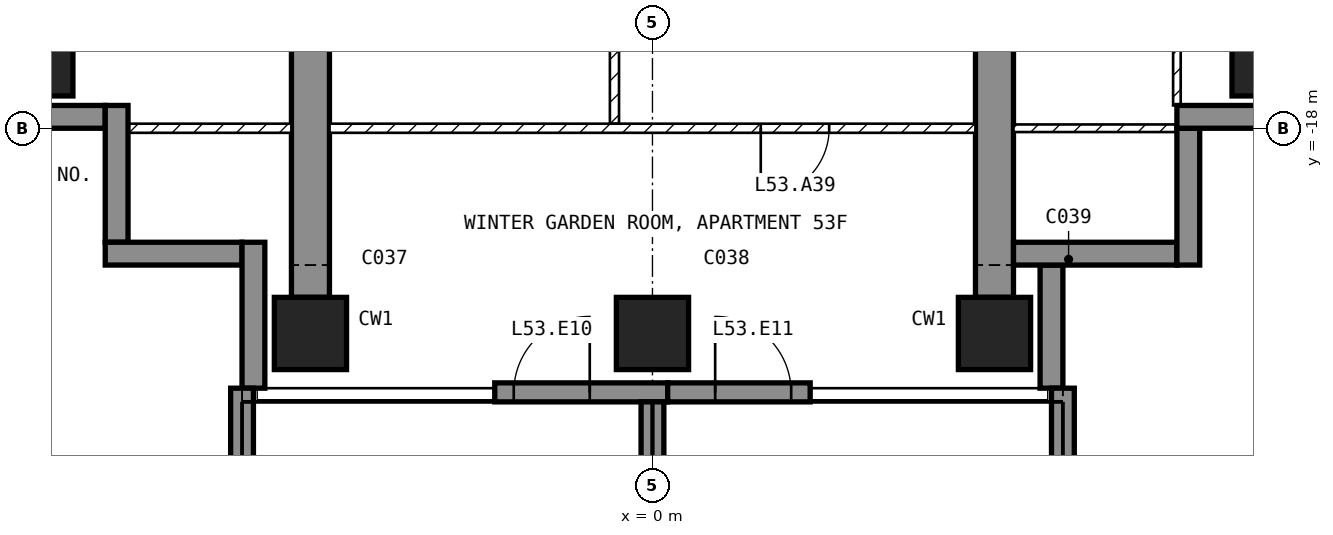
"""IFC4 building model, lengths in metres.
Left out: names, types, materials, properties, quantities, classifications, styles, units other than length and angle.
Written with IfcOpenShell. Run it as: python <this file> out.ifc"""

import sys

from ifc_helpers import new_model, si_unit, direction, frame, frame_2d, origin, origin_2d, place, context, subcontext, project, spatial, polyline, rectangle, outline, extrude, element, fill, save


model = new_model("IFC4")
c1 = context("Model", 3, precision=1e-05, world=origin(), true_north=direction((0.0, 1.0)))
c2 = subcontext(c1, "Body", "Model", "MODEL_VIEW")
j1 = project(units=[si_unit("LENGTHUNIT", "METRE"), si_unit("PLANEANGLEUNIT", "RADIAN")], contexts=[c1])
p1 = place(None, origin())
s1 = spatial("IfcSite", under=j1, at=p1, CompositionType="ELEMENT")
p2 = place(p1, origin())
s2 = spatial("IfcBuilding", under=s1, at=p2, CompositionType="ELEMENT")
p3 = place(p2, frame((0.0, 0.0, 212.1)))
s3 = spatial("IfcBuildingStorey", under=s2, at=p3, CompositionType="ELEMENT", Elevation=212.1)
for number, where, z_axis, x_axis in (
    (1, (-8.1, -17.1, -0.25), (0.0, 0.0, 1.0), (1.0, 0.0, 0.0)),
    (2, (-4.5, -20.7, -0.25), (0.0, 0.0, 1.0), (1.0, 0.0, 0.0)),
    (3, (0.0, -20.7, -0.25), (0.0, 0.0, 1.0), (1.0, 0.0, 0.0)),
    (4, (4.5, -20.7, -0.25), (0.0, 0.0, 1.0), (1.0, 0.0, 0.0)),
    (5, (8.1, -17.1, -0.25), (0.0, 0.0, 1.0), (1.0, 0.0, 0.0)),
):
    element("IfcColumn", number, at=place(p3, frame(where, z_axis=z_axis, x_axis=x_axis)), inside=s3, PredefinedType="COLUMN", context=c2, shape_type="SweptSolid", body=[
        extrude(rectangle(XDim=0.95, YDim=0.95, at=origin_2d()), origin(), (0.0, 0.0, 1.0), 3.5),
    ])
for number, where, z_axis, x_axis in (
    (6, (-4.75, -20.225, -0.25), (1.0, 0.0, 0.0), (0.0, 1.0, 0.0)),
    (7, (4.25, -20.225, -0.25), (1.0, 0.0, 0.0), (0.0, 1.0, 0.0)),
):
    element("IfcWall", number, at=place(p3, frame(where, z_axis=z_axis, x_axis=x_axis)), inside=s3, PredefinedType="SHEAR", context=c2, shape_type="SweptSolid", body=[
        extrude(outline(polyline([(0.0, 0.0), (6.725, 0.0), (6.725, 2.65), (9.125, 2.65), (9.125, 0.0), (11.225, 0.0), (11.225, 3.5), (0.0, 3.5), (0.0, 0.0)])), origin(), (0.0, 0.0, 1.0), 0.5),
    ])
p4 = place(p3, frame((-2.075, -21.475, 0.0), z_axis=(0.0, 0.0, 1.0), x_axis=(1.0, 0.0, 0.0)))
e8 = element("IfcWall", 8, at=p4, inside=s3, PredefinedType="SOLIDWALL", context=c2, shape_type="SweptSolid", body=[
    extrude(rectangle(XDim=2.275, YDim=0.25, at=frame_2d((1.137, 0.0))), origin(), (0.0, 0.0, 1.0), 3.25),
])
p5 = place(p4, frame((0.25, 0.0, 0.0)))
e9 = element("IfcOpeningElement", 9, at=p5, cuts=e8, PredefinedType="OPENING", context=c2, shape_type="SweptSolid", body=[
    extrude(rectangle(XDim=1.0, YDim=2.4, at=frame_2d((0.5, 1.2))), frame((0.0, 0.135, 0.0), z_axis=(0.0, -1.0, 0.0), x_axis=(1.0, 0.0, 0.0)), (0.0, 0.0, 1.0), 0.27),
])
p6 = place(p3, frame((0.2, -21.475, 0.0), z_axis=(0.0, 0.0, 1.0), x_axis=(1.0, 0.0, 0.0)))
e10 = element("IfcWall", 10, at=p6, inside=s3, PredefinedType="SOLIDWALL", context=c2, shape_type="SweptSolid", body=[
    extrude(rectangle(XDim=1.875, YDim=0.25, at=frame_2d((0.938, 0.0))), origin(), (0.0, 0.0, 1.0), 3.25),
])
p7 = place(p6, frame((0.625, 0.0, 0.0)))
e11 = element("IfcOpeningElement", 11, at=p7, cuts=e10, PredefinedType="OPENING", context=c2, shape_type="SweptSolid", body=[
    extrude(rectangle(XDim=1.0, YDim=2.4, at=frame_2d((0.5, 1.2))), frame((0.0, 0.135, 0.0), z_axis=(0.0, -1.0, 0.0), x_axis=(1.0, 0.0, 0.0)), (0.0, 0.0, 1.0), 0.27),
])
p8 = place(p3, frame((5.25, -21.42, 0.0), z_axis=(0.0, 0.0, 1.0), x_axis=(0.0, 1.0, 0.0)))
e12 = element("IfcWall", 12, at=p8, inside=s3, PredefinedType="SOLIDWALL", context=c2, shape_type="SweptSolid", body=[
    extrude(rectangle(XDim=1.62, YDim=0.3, at=frame_2d((0.81, 0.0))), origin(), (0.0, 0.0, 1.0), 3.25),
])
p9 = place(p3, frame((4.75, -19.65, 0.0), z_axis=(0.0, 0.0, 1.0), x_axis=(1.0, 0.0, 0.0)))
e13 = element("IfcWall", 13, at=p9, inside=s3, PredefinedType="SOLIDWALL", context=c2, shape_type="SweptSolid", body=[
    extrude(rectangle(XDim=2.15, YDim=0.3, at=frame_2d((1.075, 0.0))), origin(), (0.0, 0.0, 1.0), 3.25),
])
p10 = place(p3, frame((7.05, -19.8, 0.0), z_axis=(0.0, 0.0, 1.0), x_axis=(0.0, 1.0, 0.0)))
e14 = element("IfcWall", 14, at=p10, inside=s3, PredefinedType="SOLIDWALL", context=c2, shape_type="SweptSolid", body=[
    extrude(rectangle(XDim=1.8, YDim=0.3, at=frame_2d((0.9, 0.0))), origin(), (0.0, 0.0, 1.0), 3.25),
])
p11 = place(p3, frame((6.9, -17.85, 0.0), z_axis=(0.0, 0.0, 1.0), x_axis=(1.0, 0.0, 0.0)))
e15 = element("IfcWall", 15, at=p11, inside=s3, PredefinedType="SOLIDWALL", context=c2, shape_type="SweptSolid", body=[
    extrude(rectangle(XDim=1.85, YDim=0.3, at=frame_2d((0.925, 0.0))), origin(), (0.0, 0.0, 1.0), 3.25),
])
p12 = place(p3, frame((-8.75, -17.85, 0.0), z_axis=(0.0, 0.0, 1.0), x_axis=(1.0, 0.0, 0.0)))
e16 = element("IfcWall", 16, at=p12, inside=s3, PredefinedType="SOLIDWALL", context=c2, shape_type="SweptSolid", body=[
    extrude(rectangle(XDim=1.55, YDim=0.3, at=frame_2d((0.775, 0.0))), origin(), (0.0, 0.0, 1.0), 3.25),
])
for number, where, z_axis, x_axis in (
    (17, (-7.05, -17.7, 0.0), (0.0, 0.0, 1.0), (0.0, -1.0, 0.0)),
    (18, (-7.2, -19.65, 0.0), (0.0, 0.0, 1.0), (1.0, 0.0, 0.0)),
):
    element("IfcWall", number, at=place(p3, frame(where, z_axis=z_axis, x_axis=x_axis)), inside=s3, PredefinedType="SOLIDWALL", context=c2, shape_type="SweptSolid", body=[
        extrude(rectangle(XDim=1.8, YDim=0.3, at=frame_2d((0.9, 0.0))), origin(), (0.0, 0.0, 1.0), 3.25),
    ])
p13 = place(p3, frame((-5.25, -19.5, 0.0), z_axis=(0.0, 0.0, 1.0), x_axis=(0.0, -1.0, 0.0)))
e19 = element("IfcWall", 19, at=p13, inside=s3, PredefinedType="SOLIDWALL", context=c2, shape_type="SweptSolid", body=[
    extrude(rectangle(XDim=1.92, YDim=0.3, at=frame_2d((0.96, 0.0))), origin(), (0.0, 0.0, 1.0), 3.25),
])
p14 = place(p3, frame((-5.4, -21.42, 0.0), z_axis=(0.0, 0.0, 1.0), x_axis=(0.0, -1.0, 0.0)))
e20 = element("IfcWall", 20, at=p14, inside=s3, PredefinedType="SOLIDWALL", context=c2, shape_type="SweptSolid", body=[
    extrude(rectangle(XDim=2.88, YDim=0.3, at=frame_2d((1.44, 0.0))), origin(), (0.0, 0.0, 1.0), 3.25),
])
p15 = place(p3, frame((0.0, -21.6, 0.0), z_axis=(0.0, 0.0, 1.0), x_axis=(0.0, -1.0, 0.0)))
e21 = element("IfcWall", 21, at=p15, inside=s3, PredefinedType="SOLIDWALL", context=c2, shape_type="SweptSolid", body=[
    extrude(rectangle(XDim=2.7, YDim=0.3, at=frame_2d((1.35, 0.0))), origin(), (0.0, 0.0, 1.0), 3.25),
])
p16 = place(p3, frame((5.4, -21.42, 0.0), z_axis=(0.0, 0.0, 1.0), x_axis=(0.0, -1.0, 0.0)))
e22 = element("IfcWall", 22, at=p16, inside=s3, PredefinedType="SOLIDWALL", context=c2, shape_type="SweptSolid", body=[
    extrude(rectangle(XDim=2.88, YDim=0.3, at=frame_2d((1.44, 0.0))), origin(), (0.0, 0.0, 1.0), 3.25),
])
p17 = place(p3, frame((-0.5, -17.94, 0.0), z_axis=(0.0, 0.0, 1.0), x_axis=(0.0, 1.0, 0.0)))
e23 = element("IfcWall", 23, at=p17, inside=s3, PredefinedType="PARTITIONING", context=c2, shape_type="SweptSolid", body=[
    extrude(rectangle(XDim=2.88, YDim=0.12, at=frame_2d((1.44, 0.0))), origin(), (0.0, 0.0, 1.0), 3.25),
])
p18 = place(p17, frame((0.99, 0.0, 0.0)))
e24 = element("IfcOpeningElement", 24, at=p18, cuts=e23, PredefinedType="OPENING", context=c2, shape_type="SweptSolid", body=[
    extrude(rectangle(XDim=0.9, YDim=2.1, at=frame_2d((0.45, 1.05))), frame((0.0, 0.07, 0.0), z_axis=(0.0, -1.0, 0.0), x_axis=(1.0, 0.0, 0.0)), (0.0, 0.0, 1.0), 0.14),
])
p19 = place(p3, frame((4.25, -18.0, 0.0), z_axis=(0.0, 0.0, 1.0), x_axis=(-1.0, 0.0, 0.0)))
e25 = element("IfcWall", 25, at=p19, inside=s3, PredefinedType="PARTITIONING", context=c2, shape_type="SweptSolid", body=[
    extrude(rectangle(XDim=8.5, YDim=0.12, at=frame_2d((4.25, 0.0))), origin(), (0.0, 0.0, 1.0), 3.25),
])
p20 = place(p19, frame((1.925, 0.0, 0.0)))
e26 = element("IfcOpeningElement", 26, at=p20, cuts=e25, PredefinedType="OPENING", context=c2, shape_type="SweptSolid", body=[
    extrude(rectangle(XDim=0.9, YDim=2.1, at=frame_2d((0.45, 1.05))), frame((0.0, 0.07, 0.0), z_axis=(0.0, -1.0, 0.0), x_axis=(1.0, 0.0, 0.0)), (0.0, 0.0, 1.0), 0.14),
])
p21 = place(p3, frame((6.9, -17.7, 0.0), z_axis=(0.0, 0.0, 1.0), x_axis=(0.0, 1.0, 0.0)))
e27 = element("IfcWall", 27, at=p21, inside=s3, PredefinedType="PARTITIONING", context=c2, shape_type="SweptSolid", body=[
    extrude(rectangle(XDim=3.25, YDim=0.1, at=frame_2d((1.625, 0.0))), origin(), (0.0, 0.0, 1.0), 3.25),
])
p22 = place(p21, frame((2.05, 0.0, 0.0)))
e28 = element("IfcOpeningElement", 28, at=p22, cuts=e27, PredefinedType="OPENING", context=c2, shape_type="SweptSolid", body=[
    extrude(rectangle(XDim=0.85, YDim=2.1, at=frame_2d((0.425, 1.05))), frame((0.0, 0.06, 0.0), z_axis=(0.0, -1.0, 0.0), x_axis=(1.0, 0.0, 0.0)), (0.0, 0.0, 1.0), 0.12),
])
p23 = place(p3, frame((7.12, -18.0, 0.0), z_axis=(0.0, 0.0, 1.0), x_axis=(-1.0, 0.0, 0.0)))
e29 = element("IfcWall", 29, at=p23, inside=s3, PredefinedType="PARTITIONING", context=c2, shape_type="SweptSolid", body=[
    extrude(rectangle(XDim=2.37, YDim=0.1, at=frame_2d((1.185, 0.0))), origin(), (0.0, 0.0, 1.0), 3.25),
])
p24 = place(p3, frame((-4.75, -18.0, 0.0), z_axis=(0.0, 0.0, 1.0), x_axis=(-1.0, 0.0, 0.0)))
e30 = element("IfcWall", 30, at=p24, inside=s3, PredefinedType="PARTITIONING", context=c2, shape_type="SweptSolid", body=[
    extrude(rectangle(XDim=2.37, YDim=0.12, at=frame_2d((1.185, 0.0))), origin(), (0.0, 0.0, 1.0), 3.25),
])
p25 = place(p5, origin())
e31 = element("IfcDoor", 31, at=p25, inside=s3, OperationType="SINGLE_SWING_RIGHT", PredefinedType="DOOR", context=c2, shape_type="SweptSolid", body=[
    extrude(rectangle(XDim=1.0, YDim=2.4, at=frame_2d((0.5, 1.2))), frame((0.0, 0.025, 0.0), z_axis=(0.0, -1.0, 0.0), x_axis=(1.0, 0.0, 0.0)), (0.0, 0.0, 1.0), 0.05),
])
fill(e9, e31)
p26 = place(p7, origin())
e32 = element("IfcDoor", 32, at=p26, inside=s3, OperationType="SINGLE_SWING_LEFT", PredefinedType="DOOR", context=c2, shape_type="SweptSolid", body=[
    extrude(rectangle(XDim=1.0, YDim=2.4, at=frame_2d((0.5, 1.2))), frame((0.0, 0.025, 0.0), z_axis=(0.0, -1.0, 0.0), x_axis=(1.0, 0.0, 0.0)), (0.0, 0.0, 1.0), 0.05),
])
fill(e11, e32)
p27 = place(p20, origin())
e33 = element("IfcDoor", 33, at=p27, inside=s3, OperationType="SINGLE_SWING_RIGHT", PredefinedType="DOOR", context=c2, shape_type="SweptSolid", body=[
    extrude(rectangle(XDim=0.9, YDim=2.1, at=frame_2d((0.45, 1.05))), frame((0.0, 0.025, 0.0), z_axis=(0.0, -1.0, 0.0), x_axis=(1.0, 0.0, 0.0)), (0.0, 0.0, 1.0), 0.05),
])
fill(e26, e33)
save(model, sys.argv[1])
